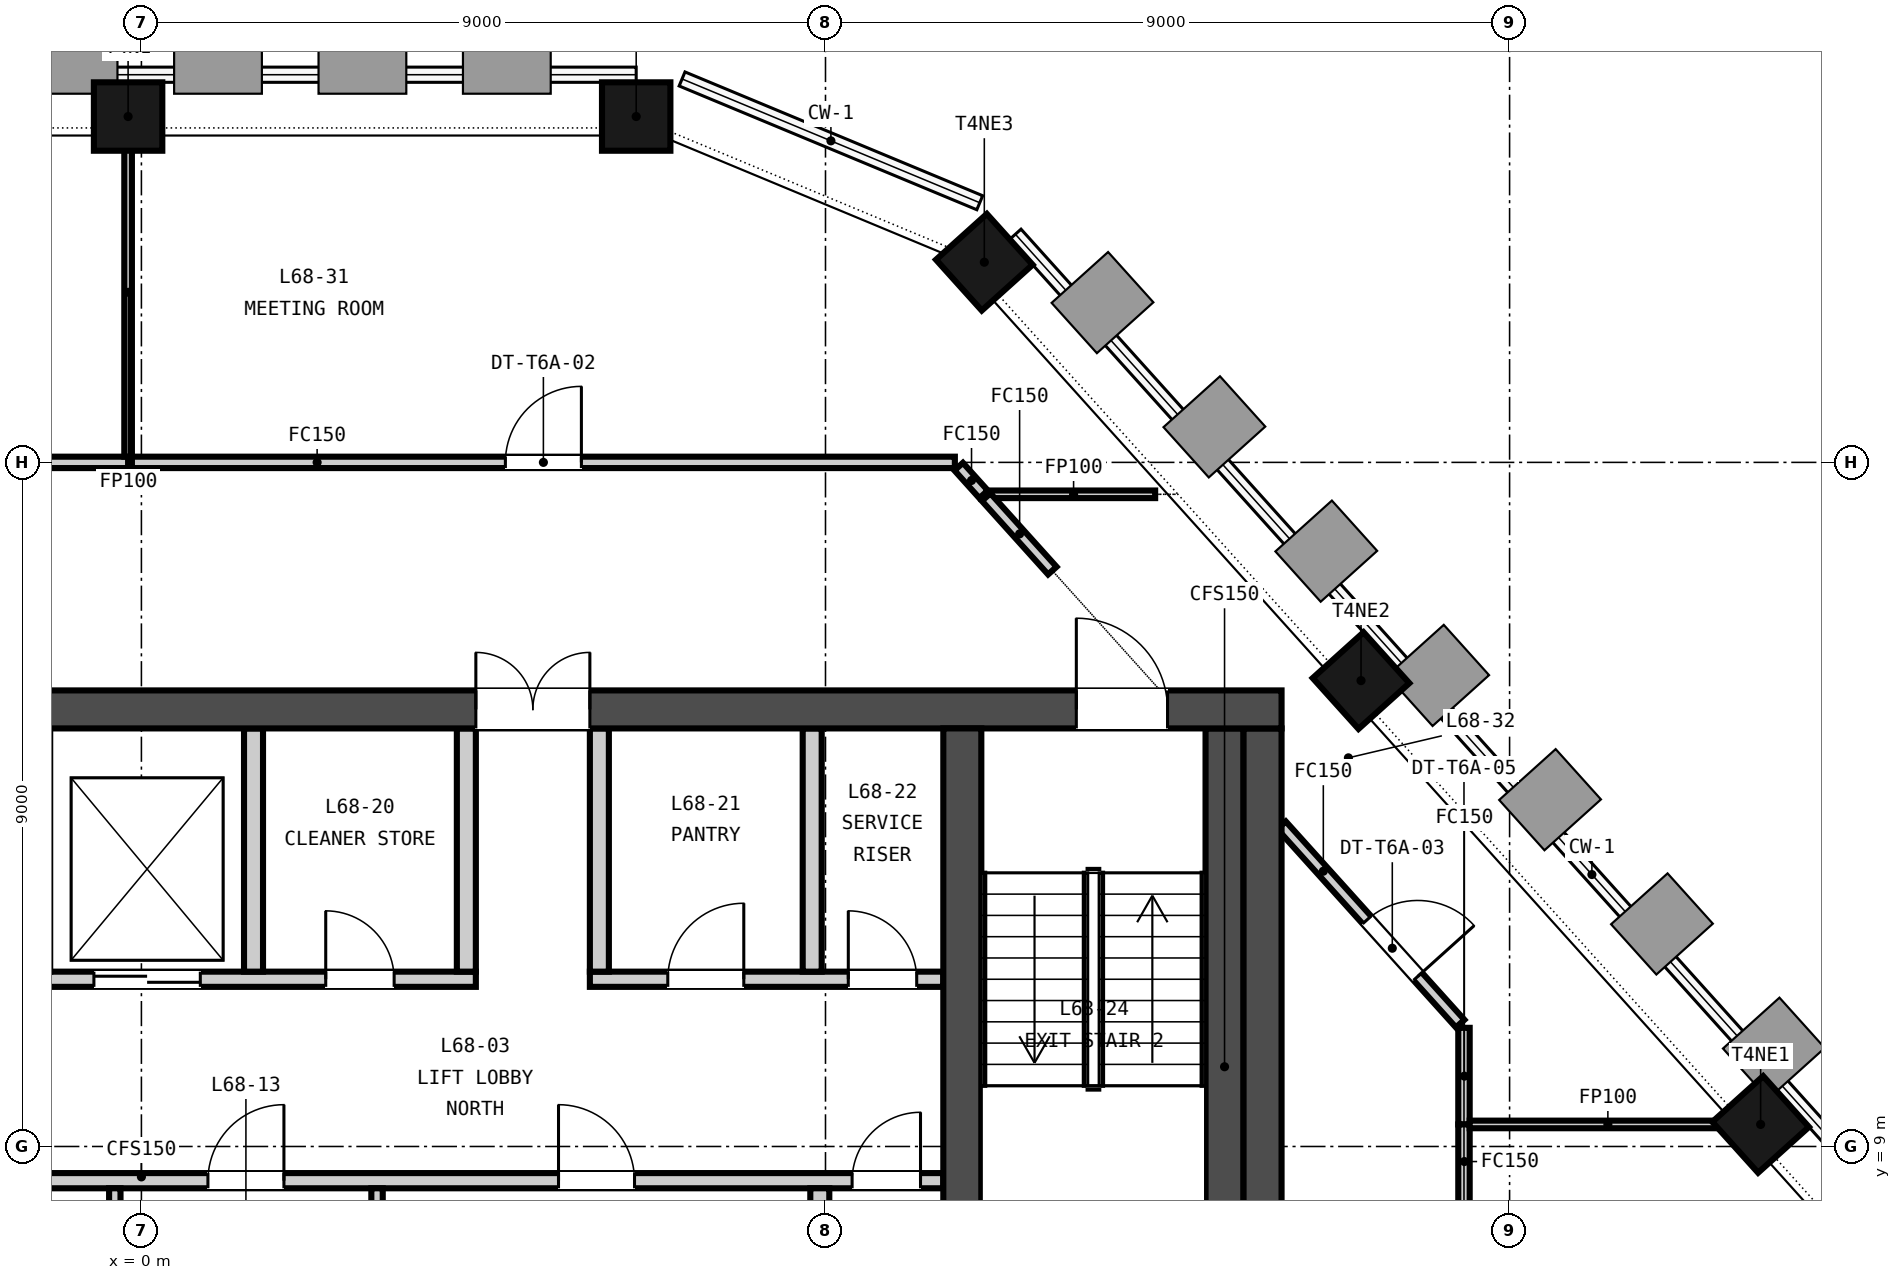
"""IFC4 building model, lengths in metres.
Left out: names, types, materials, properties, quantities, classifications, styles, units other than length and angle.
Written with IfcOpenShell. Run it as: python <this file> out.ifc"""

import sys

from ifc_helpers import new_model, si_unit, direction, frame, frame_2d, origin, origin_2d, place, context, subcontext, project, spatial, rectangle, extrude, element, fill, save


model = new_model("IFC4")
c1 = context("Model", 3, precision=1e-05, world=origin(), true_north=direction((0.0, 1.0)))
c2 = subcontext(c1, "Body", "Model", "MODEL_VIEW")
j1 = project(units=[si_unit("LENGTHUNIT", "METRE"), si_unit("PLANEANGLEUNIT", "RADIAN")], contexts=[c1])
p1 = place(None, origin())
s1 = spatial("IfcSite", under=j1, at=p1, CompositionType="ELEMENT")
p2 = place(p1, origin())
s2 = spatial("IfcBuilding", under=s1, at=p2, CompositionType="ELEMENT")
p3 = place(p2, frame((0.0, 0.0, 268.25)))
s3 = spatial("IfcBuildingStorey", under=s2, at=p3, CompositionType="ELEMENT", Elevation=268.25)
p4 = place(p3, frame((-15.0, 14.75, -0.15), z_axis=(0.0, 0.0, 1.0), x_axis=(1.0, 0.0, 0.0)))
e1 = element("IfcWall", 1, at=p4, inside=s3, PredefinedType="SOLIDWALL", context=c2, shape_type="SweptSolid", body=[
    extrude(rectangle(XDim=30.0, YDim=0.5, at=frame_2d((15.0, 0.0))), origin(), (0.0, 0.0, 1.0), 3.65),
])
p5 = place(p4, frame((9.25, 0.0, 0.15)))
e2 = element("IfcOpeningElement", 2, at=p5, cuts=e1, PredefinedType="OPENING", context=c2, shape_type="SweptSolid", body=[
    extrude(rectangle(XDim=1.5, YDim=2.1, at=frame_2d((0.75, 1.05))), frame((0.0, 0.26, 0.0), z_axis=(0.0, -1.0, 0.0), x_axis=(1.0, 0.0, 0.0)), (0.0, 0.0, 1.0), 0.52),
])
p6 = place(p4, frame((19.4, 0.0, 0.15)))
e3 = element("IfcOpeningElement", 3, at=p6, cuts=e1, PredefinedType="OPENING", context=c2, shape_type="SweptSolid", body=[
    extrude(rectangle(XDim=1.5, YDim=2.1, at=frame_2d((0.75, 1.05))), frame((0.0, 0.26, 0.0), z_axis=(0.0, -1.0, 0.0), x_axis=(1.0, 0.0, 0.0)), (0.0, 0.0, 1.0), 0.52),
])
p7 = place(p4, frame((1.5, 0.0, 0.15)))
e4 = element("IfcOpeningElement", 4, at=p7, cuts=e1, PredefinedType="OPENING", context=c2, shape_type="SweptSolid", body=[
    extrude(rectangle(XDim=1.2, YDim=2.1, at=frame_2d((0.6, 1.05))), frame((0.0, 0.26, 0.0), z_axis=(0.0, -1.0, 0.0), x_axis=(1.0, 0.0, 0.0)), (0.0, 0.0, 1.0), 0.52),
])
p8 = place(p4, frame((27.3, 0.0, 0.15)))
e5 = element("IfcOpeningElement", 5, at=p8, cuts=e1, PredefinedType="OPENING", context=c2, shape_type="SweptSolid", body=[
    extrude(rectangle(XDim=1.2, YDim=2.1, at=frame_2d((0.6, 1.05))), frame((0.0, 0.26, 0.0), z_axis=(0.0, -1.0, 0.0), x_axis=(1.0, 0.0, 0.0)), (0.0, 0.0, 1.0), 0.52),
])
for number, where, z_axis, x_axis in (
    (6, (14.75, 0.5, -0.15), (0.0, 0.0, 1.0), (0.0, 1.0, 0.0)),
    (7, (10.8, 0.5, -0.15), (0.0, 0.0, 1.0), (0.0, 1.0, 0.0)),
):
    element("IfcWall", number, at=place(p3, frame(where, z_axis=z_axis, x_axis=x_axis)), inside=s3, PredefinedType="SOLIDWALL", context=c2, shape_type="SweptSolid", body=[
        extrude(rectangle(XDim=14.0, YDim=0.5, at=frame_2d((7.0, 0.0))), origin(), (0.0, 0.0, 1.0), 3.65),
    ])
for number, where, z_axis, x_axis in (
    (8, (6.51, 22.55, -0.15), (0.0, 0.0, 1.0), (-1.0, 0.0, 0.0)),
    (9, (-0.175, 22.55, -0.15), (0.0, 0.0, 1.0), (-1.0, 0.0, 0.0)),
    (10, (21.303, 9.29, -0.15), (0.0, 0.0, 1.0), (-0.669, 0.743, 0.0)),
    (11, (16.045, 15.129, -0.15), (0.0, 0.0, 1.0), (-0.669, 0.743, 0.0)),
    (12, (11.089, 20.633, -0.15), (0.0, 0.0, 1.0), (-0.669, 0.743, 0.0)),
):
    element("IfcColumn", number, at=place(p3, frame(where, z_axis=z_axis, x_axis=x_axis)), inside=s3, PredefinedType="COLUMN", context=c2, shape_type="SweptSolid", body=[
        extrude(rectangle(XDim=0.9, YDim=0.9, at=origin_2d()), origin(), (0.0, 0.0, 1.0), 3.65),
    ])
p9 = place(p3, frame((-4.125, 8.55, 0.0), z_axis=(0.0, 0.0, 1.0), x_axis=(1.0, 0.0, 0.0)))
e13 = element("IfcWall", 13, at=p9, inside=s3, PredefinedType="PARTITIONING", context=c2, shape_type="SweptSolid", body=[
    extrude(rectangle(XDim=14.675, YDim=0.2, at=frame_2d((7.337, 0.0))), origin(), (0.0, 0.0, 1.0), 3.5),
])
p10 = place(p9, frame((1.413, 0.0, 0.0)))
e14 = element("IfcOpeningElement", 14, at=p10, cuts=e13, PredefinedType="OPENING", context=c2, shape_type="SweptSolid", body=[
    extrude(rectangle(XDim=1.0, YDim=2.1, at=frame_2d((0.5, 1.05))), frame((0.0, 0.11, 0.0), z_axis=(0.0, -1.0, 0.0), x_axis=(1.0, 0.0, 0.0)), (0.0, 0.0, 1.0), 0.22),
])
p11 = place(p9, frame((5.0, 0.0, 0.0)))
e15 = element("IfcOpeningElement", 15, at=p11, cuts=e13, PredefinedType="OPENING", context=c2, shape_type="SweptSolid", body=[
    extrude(rectangle(XDim=1.0, YDim=2.1, at=frame_2d((0.5, 1.05))), frame((0.0, 0.11, 0.0), z_axis=(0.0, -1.0, 0.0), x_axis=(1.0, 0.0, 0.0)), (0.0, 0.0, 1.0), 0.22),
])
p12 = place(p9, frame((9.613, 0.0, 0.0)))
e16 = element("IfcOpeningElement", 16, at=p12, cuts=e13, PredefinedType="OPENING", context=c2, shape_type="SweptSolid", body=[
    extrude(rectangle(XDim=1.0, YDim=2.1, at=frame_2d((0.5, 1.05))), frame((0.0, 0.11, 0.0), z_axis=(0.0, -1.0, 0.0), x_axis=(1.0, 0.0, 0.0)), (0.0, 0.0, 1.0), 0.22),
])
p13 = place(p9, frame((13.475, 0.0, 0.0)))
e17 = element("IfcOpeningElement", 17, at=p13, cuts=e13, PredefinedType="OPENING", context=c2, shape_type="SweptSolid", body=[
    extrude(rectangle(XDim=0.9, YDim=2.1, at=frame_2d((0.45, 1.05))), frame((0.0, 0.11, 0.0), z_axis=(0.0, -1.0, 0.0), x_axis=(1.0, 0.0, 0.0)), (0.0, 0.0, 1.0), 0.22),
])
p14 = place(p3, frame((-4.25, 11.2, 0.0), z_axis=(0.0, 0.0, 1.0), x_axis=(1.0, 0.0, 0.0)))
e18 = element("IfcWall", 18, at=p14, inside=s3, PredefinedType="PARTITIONING", context=c2, shape_type="SweptSolid", body=[
    extrude(rectangle(XDim=8.65, YDim=0.2, at=frame_2d((4.325, 0.0))), origin(), (0.0, 0.0, 1.0), 3.5),
])
p15 = place(p14, frame((0.825, 0.0, 0.0)))
e19 = element("IfcOpeningElement", 19, at=p15, cuts=e18, PredefinedType="OPENING", context=c2, shape_type="SweptSolid", body=[
    extrude(rectangle(XDim=1.4, YDim=2.1, at=frame_2d((0.7, 1.05))), frame((0.0, 0.11, 0.0), z_axis=(0.0, -1.0, 0.0), x_axis=(1.0, 0.0, 0.0)), (0.0, 0.0, 1.0), 0.22),
])
p16 = place(p14, frame((3.625, 0.0, 0.0)))
e20 = element("IfcOpeningElement", 20, at=p16, cuts=e18, PredefinedType="OPENING", context=c2, shape_type="SweptSolid", body=[
    extrude(rectangle(XDim=1.4, YDim=2.1, at=frame_2d((0.7, 1.05))), frame((0.0, 0.11, 0.0), z_axis=(0.0, -1.0, 0.0), x_axis=(1.0, 0.0, 0.0)), (0.0, 0.0, 1.0), 0.22),
])
p17 = place(p14, frame((6.675, 0.0, 0.0)))
e21 = element("IfcOpeningElement", 21, at=p17, cuts=e18, PredefinedType="OPENING", context=c2, shape_type="SweptSolid", body=[
    extrude(rectangle(XDim=0.9, YDim=2.1, at=frame_2d((0.45, 1.05))), frame((0.0, 0.11, 0.0), z_axis=(0.0, -1.0, 0.0), x_axis=(1.0, 0.0, 0.0)), (0.0, 0.0, 1.0), 0.22),
])
p18 = place(p3, frame((5.9, 11.2, 0.0), z_axis=(0.0, 0.0, 1.0), x_axis=(1.0, 0.0, 0.0)))
e22 = element("IfcWall", 22, at=p18, inside=s3, PredefinedType="PARTITIONING", context=c2, shape_type="SweptSolid", body=[
    extrude(rectangle(XDim=4.65, YDim=0.2, at=frame_2d((2.325, 0.0))), origin(), (0.0, 0.0, 1.0), 3.5),
])
p19 = place(p18, frame((1.025, 0.0, 0.0)))
e23 = element("IfcOpeningElement", 23, at=p19, cuts=e22, PredefinedType="OPENING", context=c2, shape_type="SweptSolid", body=[
    extrude(rectangle(XDim=1.0, YDim=2.1, at=frame_2d((0.5, 1.05))), frame((0.0, 0.11, 0.0), z_axis=(0.0, -1.0, 0.0), x_axis=(1.0, 0.0, 0.0)), (0.0, 0.0, 1.0), 0.22),
])
p20 = place(p18, frame((3.4, 0.0, 0.0)))
e24 = element("IfcOpeningElement", 24, at=p20, cuts=e22, PredefinedType="OPENING", context=c2, shape_type="SweptSolid", body=[
    extrude(rectangle(XDim=0.9, YDim=2.1, at=frame_2d((0.45, 1.05))), frame((0.0, 0.11, 0.0), z_axis=(0.0, -1.0, 0.0), x_axis=(1.0, 0.0, 0.0)), (0.0, 0.0, 1.0), 0.22),
])
for number, where, z_axis, x_axis in (
    (25, (-0.35, 6.15, 0.0), (0.0, 0.0, 1.0), (0.0, 1.0, 0.0)),
    (26, (3.1, 6.15, 0.0), (0.0, 0.0, 1.0), (0.0, 1.0, 0.0)),
):
    element("IfcWall", number, at=place(p3, frame(where, z_axis=z_axis, x_axis=x_axis)), inside=s3, PredefinedType="PARTITIONING", context=c2, shape_type="SweptSolid", body=[
        extrude(rectangle(XDim=2.3, YDim=0.15, at=frame_2d((1.15, 0.0))), origin(), (0.0, 0.0, 1.0), 3.5),
    ])
p21 = place(p3, frame((8.925, 6.15, 0.0), z_axis=(0.0, 0.0, 1.0), x_axis=(0.0, 1.0, 0.0)))
e27 = element("IfcWall", 27, at=p21, inside=s3, PredefinedType="PARTITIONING", context=c2, shape_type="SweptSolid", body=[
    extrude(rectangle(XDim=2.3, YDim=0.25, at=frame_2d((1.15, 0.0))), origin(), (0.0, 0.0, 1.0), 3.5),
])
for number, where, z_axis, x_axis in (
    (28, (1.475, 11.3, 0.0), (0.0, 0.0, 1.0), (0.0, 1.0, 0.0)),
    (29, (4.275, 11.3, 0.0), (0.0, 0.0, 1.0), (0.0, 1.0, 0.0)),
    (30, (6.025, 11.3, 0.0), (0.0, 0.0, 1.0), (0.0, 1.0, 0.0)),
    (31, (8.825, 11.3, 0.0), (0.0, 0.0, 1.0), (0.0, 1.0, 0.0)),
):
    element("IfcWall", number, at=place(p3, frame(where, z_axis=z_axis, x_axis=x_axis)), inside=s3, PredefinedType="PARTITIONING", context=c2, shape_type="SweptSolid", body=[
        extrude(rectangle(XDim=3.2, YDim=0.25, at=frame_2d((1.6, 0.0))), origin(), (0.0, 0.0, 1.0), 3.5),
    ])
p22 = place(p3, frame((14.25, 0.5, 0.0), z_axis=(0.0, 0.0, 1.0), x_axis=(0.0, 1.0, 0.0)))
e32 = element("IfcWall", 32, at=p22, inside=s3, PredefinedType="SOLIDWALL", context=c2, shape_type="SweptSolid", body=[
    extrude(rectangle(XDim=14.0, YDim=0.5, at=frame_2d((7.0, 0.0))), origin(), (0.0, 0.0, 1.0), 3.5),
])
p23 = place(p3, frame((17.4, 10.561, 0.0), z_axis=(0.0, 0.0, 1.0), x_axis=(0.0, -1.0, 0.0)))
e33 = element("IfcWall", 33, at=p23, inside=s3, PredefinedType="PARTITIONING", context=c2, shape_type="SweptSolid", body=[
    extrude(rectangle(XDim=1.271, YDim=0.15, at=frame_2d((0.635, 0.0))), origin(), (0.0, 0.0, 1.0), 2.751),
])
p24 = place(p3, frame((17.4, 9.29, 0.0), z_axis=(0.0, 0.0, 1.0), x_axis=(0.0, -1.0, 0.0)))
e34 = element("IfcWall", 34, at=p24, inside=s3, PredefinedType="PARTITIONING", context=c2, shape_type="SweptSolid", body=[
    extrude(rectangle(XDim=3.053, YDim=0.15, at=frame_2d((1.526, 0.0))), origin(), (0.0, 0.0, 1.0), 2.751),
])
p25 = place(p24, frame((1.027, 0.0, 0.0)))
e35 = element("IfcOpeningElement", 35, at=p25, cuts=e34, PredefinedType="OPENING", context=c2, shape_type="SweptSolid", body=[
    extrude(rectangle(XDim=1.0, YDim=2.1, at=frame_2d((0.5, 1.05))), frame((0.0, 0.085, 0.0), z_axis=(0.0, -1.0, 0.0), x_axis=(1.0, 0.0, 0.0)), (0.0, 0.0, 1.0), 0.17),
])
p26 = place(p3, frame((-15.103, 18.0, 0.0), z_axis=(0.0, 0.0, 1.0), x_axis=(1.0, 0.0, 0.0)))
e36 = element("IfcWall", 36, at=p26, inside=s3, PredefinedType="PARTITIONING", context=c2, shape_type="SweptSolid", body=[
    extrude(rectangle(XDim=14.928, YDim=0.15, at=frame_2d((7.464, 0.0))), origin(), (0.0, 0.0, 1.0), 2.751),
])
p27 = place(p26, frame((6.964, 0.0, 0.0)))
e37 = element("IfcOpeningElement", 37, at=p27, cuts=e36, PredefinedType="OPENING", context=c2, shape_type="SweptSolid", body=[
    extrude(rectangle(XDim=1.0, YDim=2.1, at=frame_2d((0.5, 1.05))), frame((0.0, 0.085, 0.0), z_axis=(0.0, -1.0, 0.0), x_axis=(1.0, 0.0, 0.0)), (0.0, 0.0, 1.0), 0.17),
])
p28 = place(p3, frame((-0.175, 18.075, 0.0), z_axis=(0.0, 0.0, 1.0), x_axis=(0.0, 1.0, 0.0)))
e38 = element("IfcWall", 38, at=p28, inside=s3, PredefinedType="PARTITIONING", context=c2, shape_type="SweptSolid", body=[
    extrude(rectangle(XDim=4.325, YDim=0.1, at=frame_2d((2.163, 0.0))), origin(), (0.0, 0.0, 1.0), 2.751),
])
p29 = place(p3, frame((-0.125, 18.0, 0.0), z_axis=(0.0, 0.0, 1.0), x_axis=(1.0, 0.0, 0.0)))
e39 = element("IfcWall", 39, at=p29, inside=s3, PredefinedType="PARTITIONING", context=c2, shape_type="SweptSolid", body=[
    extrude(rectangle(XDim=10.827, YDim=0.15, at=frame_2d((5.414, 0.0))), origin(), (0.0, 0.0, 1.0), 2.751),
])
p30 = place(p29, frame((4.914, 0.0, 0.0)))
e40 = element("IfcOpeningElement", 40, at=p30, cuts=e39, PredefinedType="OPENING", context=c2, shape_type="SweptSolid", body=[
    extrude(rectangle(XDim=1.0, YDim=2.1, at=frame_2d((0.5, 1.05))), frame((0.0, 0.085, 0.0), z_axis=(0.0, -1.0, 0.0), x_axis=(1.0, 0.0, 0.0)), (0.0, 0.0, 1.0), 0.17),
])
p31 = place(p3, frame((10.752, 17.944, 0.0), z_axis=(0.0, 0.0, 1.0), x_axis=(0.669019774343, -0.74324460411, 0.0)))
e41 = element("IfcWall", 41, at=p31, inside=s3, PredefinedType="PARTITIONING", context=c2, shape_type="SweptSolid", body=[
    extrude(rectangle(XDim=0.49, YDim=0.15, at=frame_2d((0.245, 0.0))), origin(), (0.0, 0.0, 1.0), 2.751),
])
p32 = place(p3, frame((11.181, 17.58, 0.0), z_axis=(0.0, 0.0, 1.0), x_axis=(1.0, 0.0, 0.0)))
e42 = element("IfcWall", 42, at=p32, inside=s3, PredefinedType="PARTITIONING", context=c2, shape_type="SweptSolid", body=[
    extrude(rectangle(XDim=2.156, YDim=0.1, at=frame_2d((1.078, 0.0))), origin(), (0.0, 0.0, 1.0), 2.751),
])
p33 = place(p3, frame((11.114, 17.543, 0.0), z_axis=(0.0, 0.0, 1.0), x_axis=(0.669172057426, -0.743107500675, 0.0)))
e43 = element("IfcWall", 43, at=p33, inside=s3, PredefinedType="PARTITIONING", context=c2, shape_type="SweptSolid", body=[
    extrude(rectangle(XDim=1.301, YDim=0.15, at=frame_2d((0.65, 0.0))), origin(), (0.0, 0.0, 1.0), 2.751),
])
p34 = place(p3, frame((15.0, 13.226, 0.0), z_axis=(0.0, 0.0, 1.0), x_axis=(0.669187491984, -0.743093601488, 0.0)))
e44 = element("IfcWall", 44, at=p34, inside=s3, PredefinedType="PARTITIONING", context=c2, shape_type="SweptSolid", body=[
    extrude(rectangle(XDim=3.511, YDim=0.15, at=frame_2d((1.756, 0.0))), origin(), (0.0, 0.0, 1.0), 2.751),
])
p35 = place(p34, frame((1.677, 0.0, 0.0)))
e45 = element("IfcOpeningElement", 45, at=p35, cuts=e44, PredefinedType="OPENING", context=c2, shape_type="SweptSolid", body=[
    extrude(rectangle(XDim=1.0, YDim=2.1, at=frame_2d((0.5, 1.05))), frame((0.0, 0.085, 0.0), z_axis=(0.0, -1.0, 0.0), x_axis=(1.0, 0.0, 0.0)), (0.0, 0.0, 1.0), 0.17),
])
p36 = place(p3, frame((17.475, 9.29, 0.0), z_axis=(0.0, 0.0, 1.0), x_axis=(1.0, 0.0, 0.0)))
e46 = element("IfcWall", 46, at=p36, inside=s3, PredefinedType="PARTITIONING", context=c2, shape_type="SweptSolid", body=[
    extrude(rectangle(XDim=3.626, YDim=0.1, at=frame_2d((1.813, 0.0))), origin(), (0.0, 0.0, 1.0), 2.751),
])
p37 = place(p11, origin())
e47 = element("IfcDoor", 47, at=p37, inside=s3, OperationType="SINGLE_SWING_RIGHT", PredefinedType="DOOR", context=c2, shape_type="SweptSolid", body=[
    extrude(rectangle(XDim=1.0, YDim=2.1, at=frame_2d((0.5, 1.05))), frame((0.0, 0.025, 0.0), z_axis=(0.0, -1.0, 0.0), x_axis=(1.0, 0.0, 0.0)), (0.0, 0.0, 1.0), 0.05),
])
fill(e15, e47)
p38 = place(p12, origin())
e48 = element("IfcDoor", 48, at=p38, inside=s3, OperationType="SINGLE_SWING_LEFT", PredefinedType="DOOR", context=c2, shape_type="SweptSolid", body=[
    extrude(rectangle(XDim=1.0, YDim=2.1, at=frame_2d((0.5, 1.05))), frame((0.0, 0.025, 0.0), z_axis=(0.0, -1.0, 0.0), x_axis=(1.0, 0.0, 0.0)), (0.0, 0.0, 1.0), 0.05),
])
fill(e16, e48)
p39 = place(p13, origin())
e49 = element("IfcDoor", 49, at=p39, inside=s3, OperationType="SINGLE_SWING_RIGHT", PredefinedType="DOOR", context=c2, shape_type="SweptSolid", body=[
    extrude(rectangle(XDim=0.9, YDim=2.1, at=frame_2d((0.45, 1.05))), frame((0.0, 0.025, 0.0), z_axis=(0.0, -1.0, 0.0), x_axis=(1.0, 0.0, 0.0)), (0.0, 0.0, 1.0), 0.05),
])
fill(e17, e49)
p40 = place(p16, origin())
e50 = element("IfcDoor", 50, at=p40, inside=s3, OperationType="DOUBLE_DOOR_SLIDING", PredefinedType="DOOR", context=c2, shape_type="SweptSolid", body=[
    extrude(rectangle(XDim=1.4, YDim=2.1, at=frame_2d((0.7, 1.05))), frame((0.0, 0.025, 0.0), z_axis=(0.0, -1.0, 0.0), x_axis=(1.0, 0.0, 0.0)), (0.0, 0.0, 1.0), 0.05),
])
fill(e20, e50)
p41 = place(p17, origin())
e51 = element("IfcDoor", 51, at=p41, inside=s3, OperationType="SINGLE_SWING_LEFT", PredefinedType="DOOR", context=c2, shape_type="SweptSolid", body=[
    extrude(rectangle(XDim=0.9, YDim=2.1, at=frame_2d((0.45, 1.05))), frame((0.0, 0.025, 0.0), z_axis=(0.0, -1.0, 0.0), x_axis=(1.0, 0.0, 0.0)), (0.0, 0.0, 1.0), 0.05),
])
fill(e21, e51)
p42 = place(p19, origin())
e52 = element("IfcDoor", 52, at=p42, inside=s3, OperationType="SINGLE_SWING_RIGHT", PredefinedType="DOOR", context=c2, shape_type="SweptSolid", body=[
    extrude(rectangle(XDim=1.0, YDim=2.1, at=frame_2d((0.5, 1.05))), frame((0.0, 0.025, 0.0), z_axis=(0.0, -1.0, 0.0), x_axis=(1.0, 0.0, 0.0)), (0.0, 0.0, 1.0), 0.05),
])
fill(e23, e52)
p43 = place(p20, origin())
e53 = element("IfcDoor", 53, at=p43, inside=s3, OperationType="SINGLE_SWING_LEFT", PredefinedType="DOOR", context=c2, shape_type="SweptSolid", body=[
    extrude(rectangle(XDim=0.9, YDim=2.1, at=frame_2d((0.45, 1.05))), frame((0.0, 0.025, 0.0), z_axis=(0.0, -1.0, 0.0), x_axis=(1.0, 0.0, 0.0)), (0.0, 0.0, 1.0), 0.05),
])
fill(e24, e53)
p44 = place(p6, origin())
e54 = element("IfcDoor", 54, at=p44, inside=s3, OperationType="DOUBLE_DOOR_SINGLE_SWING", PredefinedType="DOOR", context=c2, shape_type="SweptSolid", body=[
    extrude(rectangle(XDim=1.5, YDim=2.1, at=frame_2d((0.75, 1.05))), frame((0.0, 0.025, 0.0), z_axis=(0.0, -1.0, 0.0), x_axis=(1.0, 0.0, 0.0)), (0.0, 0.0, 1.0), 0.05),
])
fill(e3, e54)
p45 = place(p8, origin())
e55 = element("IfcDoor", 55, at=p45, inside=s3, OperationType="SINGLE_SWING_LEFT", PredefinedType="DOOR", context=c2, shape_type="SweptSolid", body=[
    extrude(rectangle(XDim=1.2, YDim=2.1, at=frame_2d((0.6, 1.05))), frame((0.0, 0.025, 0.0), z_axis=(0.0, -1.0, 0.0), x_axis=(1.0, 0.0, 0.0)), (0.0, 0.0, 1.0), 0.05),
])
fill(e5, e55)
p46 = place(p30, origin())
e56 = element("IfcDoor", 56, at=p46, inside=s3, OperationType="SINGLE_SWING_RIGHT", PredefinedType="DOOR", context=c2, shape_type="SweptSolid", body=[
    extrude(rectangle(XDim=1.0, YDim=2.1, at=frame_2d((0.5, 1.05))), frame((0.0, 0.025, 0.0), z_axis=(0.0, -1.0, 0.0), x_axis=(1.0, 0.0, 0.0)), (0.0, 0.0, 1.0), 0.05),
])
fill(e40, e56)
p47 = place(p35, origin())
e57 = element("IfcDoor", 57, at=p47, inside=s3, OperationType="SINGLE_SWING_RIGHT", PredefinedType="DOOR", context=c2, shape_type="SweptSolid", body=[
    extrude(rectangle(XDim=1.0, YDim=2.1, at=frame_2d((0.5, 1.05))), frame((0.0, 0.025, 0.0), z_axis=(0.0, -1.0, 0.0), x_axis=(1.0, 0.0, 0.0)), (0.0, 0.0, 1.0), 0.05),
])
fill(e45, e57)
save(model, sys.argv[1])
